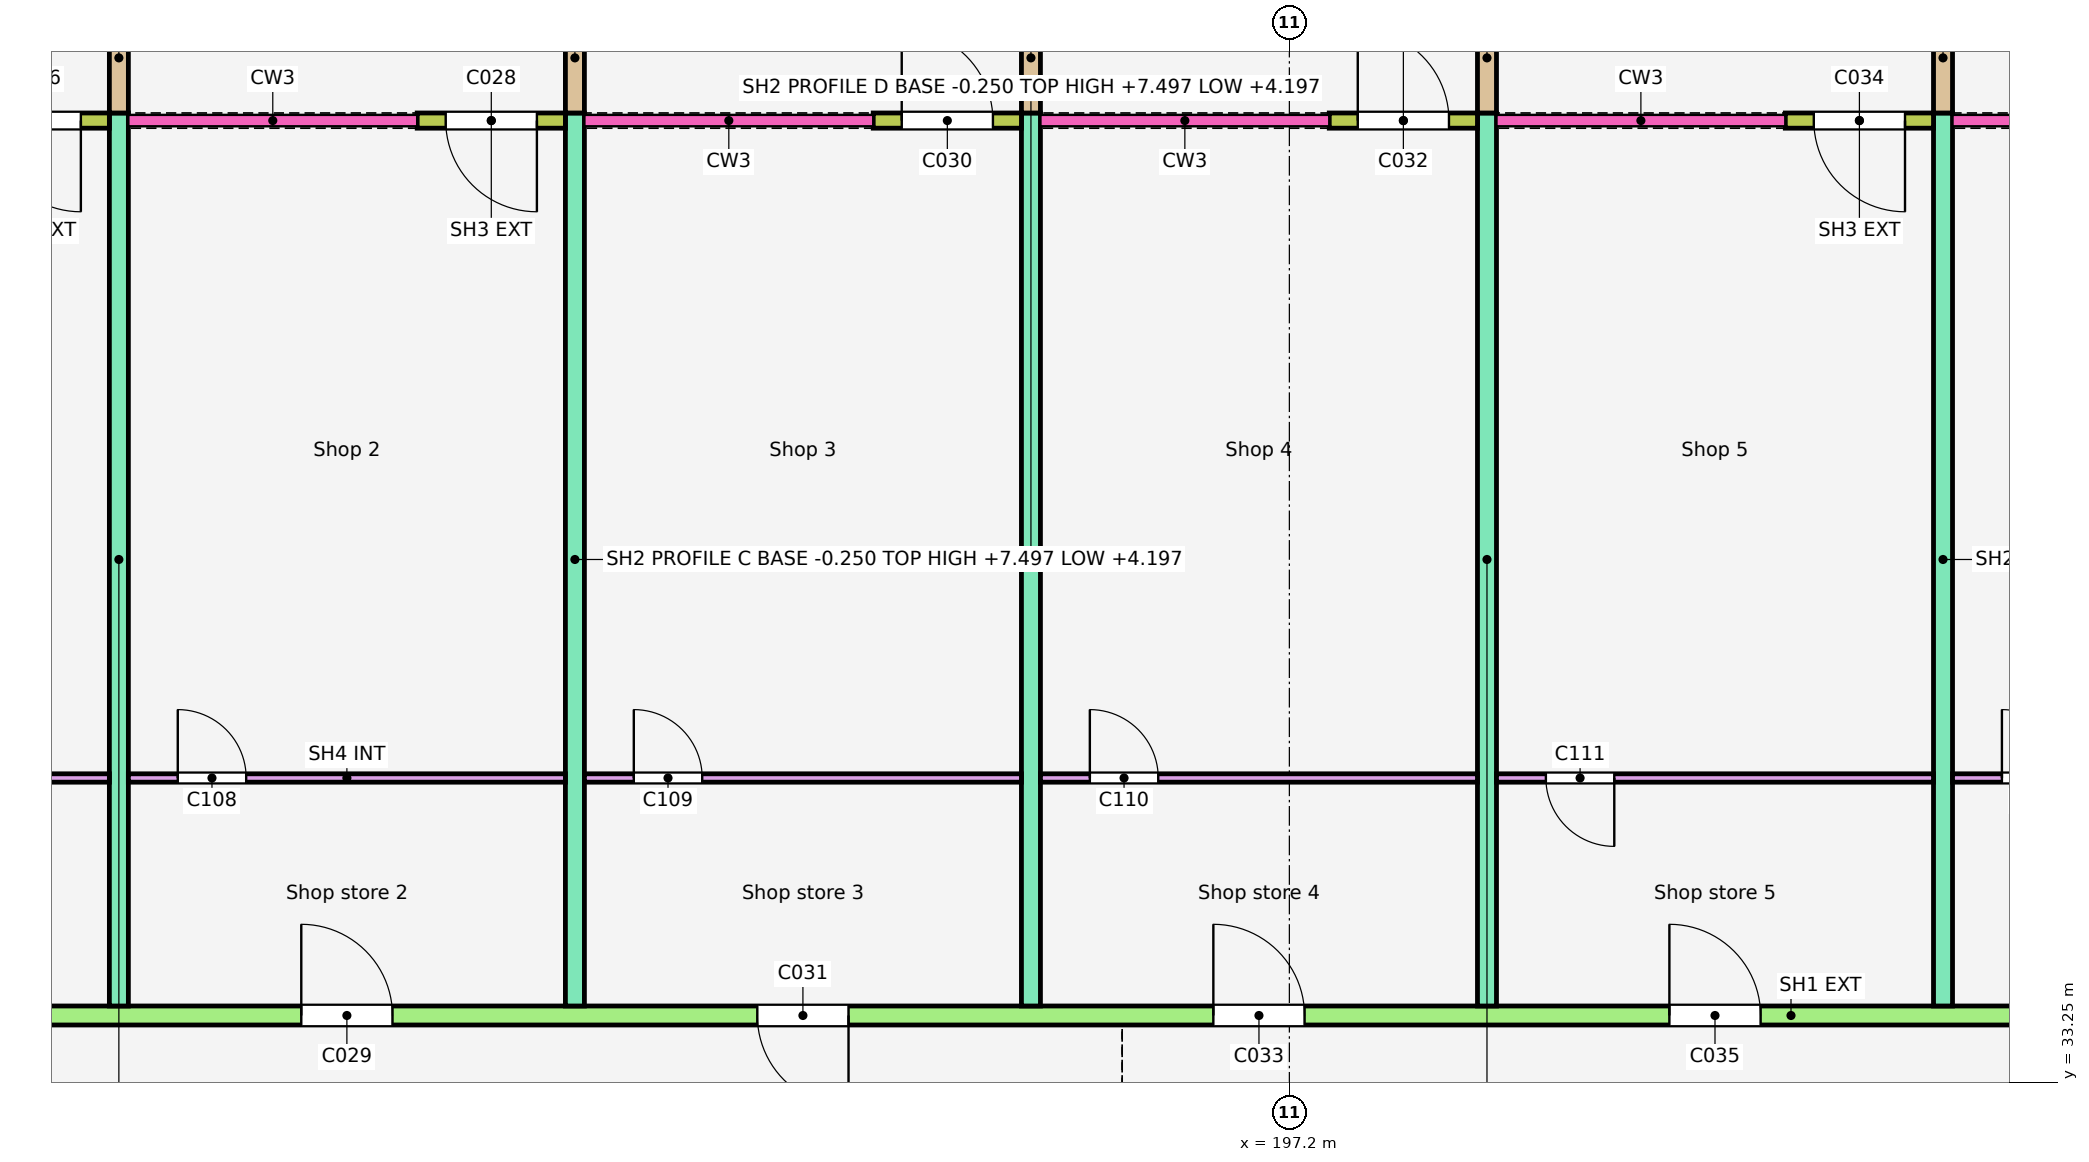
"""IFC4 building model, lengths in metres.
Left out: names, types, materials, properties, quantities, classifications, styles, units other than length and angle.
Written with IfcOpenShell. Run it as: python <this file> out.ifc"""

import sys

from ifc_helpers import new_model, si_unit, direction, frame, frame_2d, origin, place, context, subcontext, project, spatial, polyline, rectangle, outline, extrude, element, fill, save


model = new_model("IFC4")
c1 = context("Model", 3, precision=1e-05, world=origin(), true_north=direction((0.0, 1.0)))
c2 = subcontext(c1, "Body", "Model", "MODEL_VIEW")
j1 = project(units=[si_unit("LENGTHUNIT", "METRE"), si_unit("PLANEANGLEUNIT", "RADIAN")], contexts=[c1])
p1 = place(None, origin())
s1 = spatial("IfcSite", under=j1, at=p1, CompositionType="ELEMENT")
p2 = place(p1, origin())
s2 = spatial("IfcBuilding", under=s1, at=p2, CompositionType="ELEMENT")
p3 = place(p2, origin())
s3 = spatial("IfcBuildingStorey", under=s2, at=p3, CompositionType="ELEMENT", Elevation=0.0)
p4 = place(p3, frame((175.8, 34.125, -0.25), z_axis=(0.0, 0.0, 1.0), x_axis=(1.0, 0.0, 0.0)))
e1 = element("IfcWall", 1, at=p4, inside=s3, PredefinedType="SOLIDWALL", context=c2, shape_type="SweptSolid", body=[
    extrude(rectangle(XDim=56.0, YDim=0.25, at=frame_2d((28.0, 0.0))), origin(), (0.0, 0.0, 1.0), 4.445),
])
p5 = place(p4, frame((2.462, 0.0, 0.25)))
e2 = element("IfcOpeningElement", 2, at=p5, cuts=e1, PredefinedType="OPENING", context=c2, shape_type="SweptSolid", body=[
    extrude(rectangle(XDim=1.2, YDim=2.1, at=frame_2d((0.6, 1.05))), frame((0.0, 0.135, 0.0), z_axis=(0.0, -1.0, 0.0), x_axis=(1.0, 0.0, 0.0)), (0.0, 0.0, 1.0), 0.27),
])
p6 = place(p4, frame((8.4, 0.0, 0.25)))
e3 = element("IfcOpeningElement", 3, at=p6, cuts=e1, PredefinedType="OPENING", context=c2, shape_type="SweptSolid", body=[
    extrude(rectangle(XDim=1.2, YDim=2.1, at=frame_2d((0.6, 1.05))), frame((0.0, 0.135, 0.0), z_axis=(0.0, -1.0, 0.0), x_axis=(1.0, 0.0, 0.0)), (0.0, 0.0, 1.0), 0.27),
])
p7 = place(p4, frame((14.4, 0.0, 0.25)))
e4 = element("IfcOpeningElement", 4, at=p7, cuts=e1, PredefinedType="OPENING", context=c2, shape_type="SweptSolid", body=[
    extrude(rectangle(XDim=1.2, YDim=2.1, at=frame_2d((0.6, 1.05))), frame((0.0, 0.135, 0.0), z_axis=(0.0, -1.0, 0.0), x_axis=(1.0, 0.0, 0.0)), (0.0, 0.0, 1.0), 0.27),
])
p8 = place(p4, frame((20.4, 0.0, 0.25)))
e5 = element("IfcOpeningElement", 5, at=p8, cuts=e1, PredefinedType="OPENING", context=c2, shape_type="SweptSolid", body=[
    extrude(rectangle(XDim=1.2, YDim=2.1, at=frame_2d((0.6, 1.05))), frame((0.0, 0.135, 0.0), z_axis=(0.0, -1.0, 0.0), x_axis=(1.0, 0.0, 0.0)), (0.0, 0.0, 1.0), 0.27),
])
p9 = place(p4, frame((26.4, 0.0, 0.25)))
e6 = element("IfcOpeningElement", 6, at=p9, cuts=e1, PredefinedType="OPENING", context=c2, shape_type="SweptSolid", body=[
    extrude(rectangle(XDim=1.2, YDim=2.1, at=frame_2d((0.6, 1.05))), frame((0.0, 0.135, 0.0), z_axis=(0.0, -1.0, 0.0), x_axis=(1.0, 0.0, 0.0)), (0.0, 0.0, 1.0), 0.27),
])
p10 = place(p4, frame((32.4, 0.0, 0.25)))
e7 = element("IfcOpeningElement", 7, at=p10, cuts=e1, PredefinedType="OPENING", context=c2, shape_type="SweptSolid", body=[
    extrude(rectangle(XDim=1.2, YDim=2.1, at=frame_2d((0.6, 1.05))), frame((0.0, 0.135, 0.0), z_axis=(0.0, -1.0, 0.0), x_axis=(1.0, 0.0, 0.0)), (0.0, 0.0, 1.0), 0.27),
])
p11 = place(p4, frame((38.4, 0.0, 0.25)))
e8 = element("IfcOpeningElement", 8, at=p11, cuts=e1, PredefinedType="OPENING", context=c2, shape_type="SweptSolid", body=[
    extrude(rectangle(XDim=1.2, YDim=2.1, at=frame_2d((0.6, 1.05))), frame((0.0, 0.135, 0.0), z_axis=(0.0, -1.0, 0.0), x_axis=(1.0, 0.0, 0.0)), (0.0, 0.0, 1.0), 0.27),
])
p12 = place(p4, frame((44.4, 0.0, 0.25)))
e9 = element("IfcOpeningElement", 9, at=p12, cuts=e1, PredefinedType="OPENING", context=c2, shape_type="SweptSolid", body=[
    extrude(rectangle(XDim=1.2, YDim=2.1, at=frame_2d((0.6, 1.05))), frame((0.0, 0.135, 0.0), z_axis=(0.0, -1.0, 0.0), x_axis=(1.0, 0.0, 0.0)), (0.0, 0.0, 1.0), 0.27),
])
p13 = place(p4, frame((49.5, 0.0, 0.25)))
e10 = element("IfcOpeningElement", 10, at=p13, cuts=e1, PredefinedType="OPENING", context=c2, shape_type="SweptSolid", body=[
    extrude(rectangle(XDim=1.2, YDim=2.1, at=frame_2d((0.6, 1.05))), frame((0.0, 0.135, 0.0), z_axis=(0.0, -1.0, 0.0), x_axis=(1.0, 0.0, 0.0)), (0.0, 0.0, 1.0), 0.27),
])
p14 = place(p4, frame((53.3, 0.0, 0.25)))
e11 = element("IfcOpeningElement", 11, at=p14, cuts=e1, PredefinedType="OPENING", context=c2, shape_type="SweptSolid", body=[
    extrude(rectangle(XDim=1.0, YDim=2.1, at=frame_2d((0.5, 1.05))), frame((0.0, 0.135, 0.0), z_axis=(0.0, -1.0, 0.0), x_axis=(1.0, 0.0, 0.0)), (0.0, 0.0, 1.0), 0.27),
])
for number, where, z_axis, x_axis in (
    (12, (181.8, 34.25, -0.25), (0.0, 0.0, 1.0), (0.0, 1.0, 0.0)),
    (13, (187.8, 34.25, -0.25), (0.0, 0.0, 1.0), (0.0, 1.0, 0.0)),
    (14, (193.8, 34.25, -0.25), (0.0, 0.0, 1.0), (0.0, 1.0, 0.0)),
    (15, (199.8, 34.25, -0.25), (0.0, 0.0, 1.0), (0.0, 1.0, 0.0)),
    (16, (205.8, 34.25, -0.25), (0.0, 0.0, 1.0), (0.0, 1.0, 0.0)),
):
    element("IfcWall", number, at=place(p3, frame(where, z_axis=z_axis, x_axis=x_axis)), inside=s3, PredefinedType="SOLIDWALL", context=c2, shape_type="SweptSolid", body=[
        extrude(outline(polyline([(0.0, 0.0), (11.75, 0.0), (11.55, 7.663), (7.726, 4.447), (7.725, 7.747), (3.801, 4.447), (3.8, 7.747), (0.0, 4.552), (0.0, 0.0)])), frame((0.0, 0.125, 0.0), z_axis=(0.0, -1.0, 0.0), x_axis=(1.0, 0.0, 0.0)), (0.0, 0.0, 1.0), 0.25),
    ])
p15 = place(p3, frame((179.725, 45.9, -0.25), z_axis=(0.0, 0.0, 1.0), x_axis=(1.0, 0.0, 0.0)))
e17 = element("IfcWall", 17, at=p15, inside=s3, PredefinedType="SOLIDWALL", context=c2, shape_type="SweptSolid", body=[
    extrude(rectangle(XDim=1.95, YDim=0.2, at=frame_2d((0.975, 0.0))), origin(), (0.0, 0.0, 1.0), 4.45),
])
p16 = place(p15, frame((0.375, 0.0, 0.25)))
e18 = element("IfcOpeningElement", 18, at=p16, cuts=e17, PredefinedType="OPENING", context=c2, shape_type="SweptSolid", body=[
    extrude(rectangle(XDim=1.2, YDim=2.1, at=frame_2d((0.6, 1.05))), frame((0.0, 0.11, 0.0), z_axis=(0.0, -1.0, 0.0), x_axis=(1.0, 0.0, 0.0)), (0.0, 0.0, 1.0), 0.22),
])
p17 = place(p3, frame((185.725, 45.9, -0.25), z_axis=(0.0, 0.0, 1.0), x_axis=(1.0, 0.0, 0.0)))
e19 = element("IfcWall", 19, at=p17, inside=s3, PredefinedType="SOLIDWALL", context=c2, shape_type="SweptSolid", body=[
    extrude(rectangle(XDim=1.95, YDim=0.2, at=frame_2d((0.975, 0.0))), origin(), (0.0, 0.0, 1.0), 4.45),
])
p18 = place(p17, frame((0.375, 0.0, 0.25)))
e20 = element("IfcOpeningElement", 20, at=p18, cuts=e19, PredefinedType="OPENING", context=c2, shape_type="SweptSolid", body=[
    extrude(rectangle(XDim=1.2, YDim=2.1, at=frame_2d((0.6, 1.05))), frame((0.0, 0.11, 0.0), z_axis=(0.0, -1.0, 0.0), x_axis=(1.0, 0.0, 0.0)), (0.0, 0.0, 1.0), 0.22),
])
p19 = place(p3, frame((191.725, 45.9, -0.25), z_axis=(0.0, 0.0, 1.0), x_axis=(1.0, 0.0, 0.0)))
e21 = element("IfcWall", 21, at=p19, inside=s3, PredefinedType="SOLIDWALL", context=c2, shape_type="SweptSolid", body=[
    extrude(rectangle(XDim=1.95, YDim=0.2, at=frame_2d((0.975, 0.0))), origin(), (0.0, 0.0, 1.0), 4.45),
])
p20 = place(p19, frame((0.375, 0.0, 0.25)))
e22 = element("IfcOpeningElement", 22, at=p20, cuts=e21, PredefinedType="OPENING", context=c2, shape_type="SweptSolid", body=[
    extrude(rectangle(XDim=1.2, YDim=2.1, at=frame_2d((0.6, 1.05))), frame((0.0, 0.11, 0.0), z_axis=(0.0, -1.0, 0.0), x_axis=(1.0, 0.0, 0.0)), (0.0, 0.0, 1.0), 0.22),
])
p21 = place(p3, frame((197.725, 45.9, -0.25), z_axis=(0.0, 0.0, 1.0), x_axis=(1.0, 0.0, 0.0)))
e23 = element("IfcWall", 23, at=p21, inside=s3, PredefinedType="SOLIDWALL", context=c2, shape_type="SweptSolid", body=[
    extrude(rectangle(XDim=1.95, YDim=0.2, at=frame_2d((0.975, 0.0))), origin(), (0.0, 0.0, 1.0), 4.45),
])
p22 = place(p21, frame((0.375, 0.0, 0.25)))
e24 = element("IfcOpeningElement", 24, at=p22, cuts=e23, PredefinedType="OPENING", context=c2, shape_type="SweptSolid", body=[
    extrude(rectangle(XDim=1.2, YDim=2.1, at=frame_2d((0.6, 1.05))), frame((0.0, 0.11, 0.0), z_axis=(0.0, -1.0, 0.0), x_axis=(1.0, 0.0, 0.0)), (0.0, 0.0, 1.0), 0.22),
])
p23 = place(p3, frame((203.725, 45.9, -0.25), z_axis=(0.0, 0.0, 1.0), x_axis=(1.0, 0.0, 0.0)))
e25 = element("IfcWall", 25, at=p23, inside=s3, PredefinedType="SOLIDWALL", context=c2, shape_type="SweptSolid", body=[
    extrude(rectangle(XDim=1.95, YDim=0.2, at=frame_2d((0.975, 0.0))), origin(), (0.0, 0.0, 1.0), 4.45),
])
p24 = place(p23, frame((0.375, 0.0, 0.25)))
e26 = element("IfcOpeningElement", 26, at=p24, cuts=e25, PredefinedType="OPENING", context=c2, shape_type="SweptSolid", body=[
    extrude(rectangle(XDim=1.2, YDim=2.1, at=frame_2d((0.6, 1.05))), frame((0.0, 0.11, 0.0), z_axis=(0.0, -1.0, 0.0), x_axis=(1.0, 0.0, 0.0)), (0.0, 0.0, 1.0), 0.22),
])
for number, where, z_axis, x_axis in (
    (27, (181.8, 46.0, -0.25), (0.0, 0.0, 1.0), (0.0, 1.0, 0.0)),
    (28, (187.8, 46.0, -0.25), (0.0, 0.0, 1.0), (0.0, 1.0, 0.0)),
    (29, (193.8, 46.0, -0.25), (0.0, 0.0, 1.0), (0.0, 1.0, 0.0)),
    (30, (199.8, 46.0, -0.25), (0.0, 0.0, 1.0), (0.0, 1.0, 0.0)),
    (31, (205.8, 46.0, -0.25), (0.0, 0.0, 1.0), (0.0, 1.0, 0.0)),
):
    element("IfcWall", number, at=place(p3, frame(where, z_axis=z_axis, x_axis=x_axis)), inside=s3, PredefinedType="SOLIDWALL", context=c2, shape_type="SweptSolid", body=[
        extrude(outline(polyline([(0.0, 0.0), (1.45, 0.0), (1.45, 4.36), (0.0, 4.447), (0.0, 0.0)])), frame((0.0, 0.125, 0.0), z_axis=(0.0, -1.0, 0.0), x_axis=(1.0, 0.0, 0.0)), (0.0, 0.0, 1.0), 0.25),
    ])
p25 = place(p3, frame((176.05, 37.25, 0.0), z_axis=(0.0, 0.0, 1.0), x_axis=(1.0, 0.0, 0.0)))
e32 = element("IfcWall", 32, at=p25, inside=s3, PredefinedType="PARTITIONING", context=c2, shape_type="SweptSolid", body=[
    extrude(rectangle(XDim=5.625, YDim=0.11, at=frame_2d((2.812, 0.0))), origin(), (0.0, 0.0, 1.0), 3.0),
])
p26 = place(p25, frame((0.65, 0.0, 0.0)))
e33 = element("IfcOpeningElement", 33, at=p26, cuts=e32, PredefinedType="OPENING", context=c2, shape_type="SweptSolid", body=[
    extrude(rectangle(XDim=0.9, YDim=2.1, at=frame_2d((0.45, 1.05))), frame((0.0, 0.065, 0.0), z_axis=(0.0, -1.0, 0.0), x_axis=(1.0, 0.0, 0.0)), (0.0, 0.0, 1.0), 0.13),
])
p27 = place(p3, frame((181.925, 37.25, 0.0), z_axis=(0.0, 0.0, 1.0), x_axis=(1.0, 0.0, 0.0)))
e34 = element("IfcWall", 34, at=p27, inside=s3, PredefinedType="PARTITIONING", context=c2, shape_type="SweptSolid", body=[
    extrude(rectangle(XDim=5.75, YDim=0.11, at=frame_2d((2.875, 0.0))), origin(), (0.0, 0.0, 1.0), 3.0),
])
p28 = place(p27, frame((0.65, 0.0, 0.0)))
e35 = element("IfcOpeningElement", 35, at=p28, cuts=e34, PredefinedType="OPENING", context=c2, shape_type="SweptSolid", body=[
    extrude(rectangle(XDim=0.9, YDim=2.1, at=frame_2d((0.45, 1.05))), frame((0.0, 0.065, 0.0), z_axis=(0.0, -1.0, 0.0), x_axis=(1.0, 0.0, 0.0)), (0.0, 0.0, 1.0), 0.13),
])
p29 = place(p3, frame((187.925, 37.25, 0.0), z_axis=(0.0, 0.0, 1.0), x_axis=(1.0, 0.0, 0.0)))
e36 = element("IfcWall", 36, at=p29, inside=s3, PredefinedType="PARTITIONING", context=c2, shape_type="SweptSolid", body=[
    extrude(rectangle(XDim=5.75, YDim=0.11, at=frame_2d((2.875, 0.0))), origin(), (0.0, 0.0, 1.0), 3.0),
])
p30 = place(p29, frame((0.65, 0.0, 0.0)))
e37 = element("IfcOpeningElement", 37, at=p30, cuts=e36, PredefinedType="OPENING", context=c2, shape_type="SweptSolid", body=[
    extrude(rectangle(XDim=0.9, YDim=2.1, at=frame_2d((0.45, 1.05))), frame((0.0, 0.065, 0.0), z_axis=(0.0, -1.0, 0.0), x_axis=(1.0, 0.0, 0.0)), (0.0, 0.0, 1.0), 0.13),
])
p31 = place(p3, frame((193.925, 37.25, 0.0), z_axis=(0.0, 0.0, 1.0), x_axis=(1.0, 0.0, 0.0)))
e38 = element("IfcWall", 38, at=p31, inside=s3, PredefinedType="PARTITIONING", context=c2, shape_type="SweptSolid", body=[
    extrude(rectangle(XDim=5.75, YDim=0.11, at=frame_2d((2.875, 0.0))), origin(), (0.0, 0.0, 1.0), 3.0),
])
p32 = place(p31, frame((0.65, 0.0, 0.0)))
e39 = element("IfcOpeningElement", 39, at=p32, cuts=e38, PredefinedType="OPENING", context=c2, shape_type="SweptSolid", body=[
    extrude(rectangle(XDim=0.9, YDim=2.1, at=frame_2d((0.45, 1.05))), frame((0.0, 0.065, 0.0), z_axis=(0.0, -1.0, 0.0), x_axis=(1.0, 0.0, 0.0)), (0.0, 0.0, 1.0), 0.13),
])
p33 = place(p3, frame((199.925, 37.25, 0.0), z_axis=(0.0, 0.0, 1.0), x_axis=(1.0, 0.0, 0.0)))
e40 = element("IfcWall", 40, at=p33, inside=s3, PredefinedType="PARTITIONING", context=c2, shape_type="SweptSolid", body=[
    extrude(rectangle(XDim=5.75, YDim=0.11, at=frame_2d((2.875, 0.0))), origin(), (0.0, 0.0, 1.0), 3.0),
])
p34 = place(p33, frame((0.65, 0.0, 0.0)))
e41 = element("IfcOpeningElement", 41, at=p34, cuts=e40, PredefinedType="OPENING", context=c2, shape_type="SweptSolid", body=[
    extrude(rectangle(XDim=0.9, YDim=2.1, at=frame_2d((0.45, 1.05))), frame((0.0, 0.065, 0.0), z_axis=(0.0, -1.0, 0.0), x_axis=(1.0, 0.0, 0.0)), (0.0, 0.0, 1.0), 0.13),
])
p35 = place(p3, frame((205.925, 37.25, 0.0), z_axis=(0.0, 0.0, 1.0), x_axis=(1.0, 0.0, 0.0)))
e42 = element("IfcWall", 42, at=p35, inside=s3, PredefinedType="PARTITIONING", context=c2, shape_type="SweptSolid", body=[
    extrude(rectangle(XDim=5.75, YDim=0.11, at=frame_2d((2.875, 0.0))), origin(), (0.0, 0.0, 1.0), 3.0),
])
p36 = place(p35, frame((0.65, 0.0, 0.0)))
e43 = element("IfcOpeningElement", 43, at=p36, cuts=e42, PredefinedType="OPENING", context=c2, shape_type="SweptSolid", body=[
    extrude(rectangle(XDim=0.9, YDim=2.1, at=frame_2d((0.45, 1.05))), frame((0.0, 0.065, 0.0), z_axis=(0.0, -1.0, 0.0), x_axis=(1.0, 0.0, 0.0)), (0.0, 0.0, 1.0), 0.13),
])
p37 = place(p16, origin())
e44 = element("IfcDoor", 44, at=p37, inside=s3, OperationType="SINGLE_SWING_RIGHT", PredefinedType="DOOR", context=c2, shape_type="SweptSolid", body=[
    extrude(rectangle(XDim=1.2, YDim=2.1, at=frame_2d((0.6, 1.05))), frame((0.0, 0.025, 0.0), z_axis=(0.0, -1.0, 0.0), x_axis=(1.0, 0.0, 0.0)), (0.0, 0.0, 1.0), 0.05),
])
fill(e18, e44)
p38 = place(p18, origin())
e45 = element("IfcDoor", 45, at=p38, inside=s3, OperationType="SINGLE_SWING_RIGHT", PredefinedType="DOOR", context=c2, shape_type="SweptSolid", body=[
    extrude(rectangle(XDim=1.2, YDim=2.1, at=frame_2d((0.6, 1.05))), frame((0.0, 0.025, 0.0), z_axis=(0.0, -1.0, 0.0), x_axis=(1.0, 0.0, 0.0)), (0.0, 0.0, 1.0), 0.05),
])
fill(e20, e45)
p39 = place(p6, origin())
e46 = element("IfcDoor", 46, at=p39, inside=s3, OperationType="SINGLE_SWING_LEFT", PredefinedType="DOOR", context=c2, shape_type="SweptSolid", body=[
    extrude(rectangle(XDim=1.2, YDim=2.1, at=frame_2d((0.6, 1.05))), frame((0.0, 0.025, 0.0), z_axis=(0.0, -1.0, 0.0), x_axis=(1.0, 0.0, 0.0)), (0.0, 0.0, 1.0), 0.05),
])
fill(e3, e46)
p40 = place(p20, origin())
e47 = element("IfcDoor", 47, at=p40, inside=s3, OperationType="SINGLE_SWING_LEFT", PredefinedType="DOOR", context=c2, shape_type="SweptSolid", body=[
    extrude(rectangle(XDim=1.2, YDim=2.1, at=frame_2d((0.6, 1.05))), frame((0.0, 0.025, 0.0), z_axis=(0.0, -1.0, 0.0), x_axis=(1.0, 0.0, 0.0)), (0.0, 0.0, 1.0), 0.05),
])
fill(e22, e47)
p41 = place(p7, origin())
e48 = element("IfcDoor", 48, at=p41, inside=s3, OperationType="SINGLE_SWING_RIGHT", PredefinedType="DOOR", context=c2, shape_type="SweptSolid", body=[
    extrude(rectangle(XDim=1.2, YDim=2.1, at=frame_2d((0.6, 1.05))), frame((0.0, 0.025, 0.0), z_axis=(0.0, -1.0, 0.0), x_axis=(1.0, 0.0, 0.0)), (0.0, 0.0, 1.0), 0.05),
])
fill(e4, e48)
p42 = place(p22, origin())
e49 = element("IfcDoor", 49, at=p42, inside=s3, OperationType="SINGLE_SWING_LEFT", PredefinedType="DOOR", context=c2, shape_type="SweptSolid", body=[
    extrude(rectangle(XDim=1.2, YDim=2.1, at=frame_2d((0.6, 1.05))), frame((0.0, 0.025, 0.0), z_axis=(0.0, -1.0, 0.0), x_axis=(1.0, 0.0, 0.0)), (0.0, 0.0, 1.0), 0.05),
])
fill(e24, e49)
p43 = place(p8, origin())
e50 = element("IfcDoor", 50, at=p43, inside=s3, OperationType="SINGLE_SWING_LEFT", PredefinedType="DOOR", context=c2, shape_type="SweptSolid", body=[
    extrude(rectangle(XDim=1.2, YDim=2.1, at=frame_2d((0.6, 1.05))), frame((0.0, 0.025, 0.0), z_axis=(0.0, -1.0, 0.0), x_axis=(1.0, 0.0, 0.0)), (0.0, 0.0, 1.0), 0.05),
])
fill(e5, e50)
p44 = place(p24, origin())
e51 = element("IfcDoor", 51, at=p44, inside=s3, OperationType="SINGLE_SWING_RIGHT", PredefinedType="DOOR", context=c2, shape_type="SweptSolid", body=[
    extrude(rectangle(XDim=1.2, YDim=2.1, at=frame_2d((0.6, 1.05))), frame((0.0, 0.025, 0.0), z_axis=(0.0, -1.0, 0.0), x_axis=(1.0, 0.0, 0.0)), (0.0, 0.0, 1.0), 0.05),
])
fill(e26, e51)
p45 = place(p9, origin())
e52 = element("IfcDoor", 52, at=p45, inside=s3, OperationType="SINGLE_SWING_LEFT", PredefinedType="DOOR", context=c2, shape_type="SweptSolid", body=[
    extrude(rectangle(XDim=1.2, YDim=2.1, at=frame_2d((0.6, 1.05))), frame((0.0, 0.025, 0.0), z_axis=(0.0, -1.0, 0.0), x_axis=(1.0, 0.0, 0.0)), (0.0, 0.0, 1.0), 0.05),
])
fill(e6, e52)
p46 = place(p28, origin())
e53 = element("IfcDoor", 53, at=p46, inside=s3, OperationType="SINGLE_SWING_LEFT", PredefinedType="DOOR", context=c2, shape_type="SweptSolid", body=[
    extrude(rectangle(XDim=0.9, YDim=2.1, at=frame_2d((0.45, 1.05))), frame((0.0, 0.025, 0.0), z_axis=(0.0, -1.0, 0.0), x_axis=(1.0, 0.0, 0.0)), (0.0, 0.0, 1.0), 0.05),
])
fill(e35, e53)
p47 = place(p30, origin())
e54 = element("IfcDoor", 54, at=p47, inside=s3, OperationType="SINGLE_SWING_LEFT", PredefinedType="DOOR", context=c2, shape_type="SweptSolid", body=[
    extrude(rectangle(XDim=0.9, YDim=2.1, at=frame_2d((0.45, 1.05))), frame((0.0, 0.025, 0.0), z_axis=(0.0, -1.0, 0.0), x_axis=(1.0, 0.0, 0.0)), (0.0, 0.0, 1.0), 0.05),
])
fill(e37, e54)
p48 = place(p32, origin())
e55 = element("IfcDoor", 55, at=p48, inside=s3, OperationType="SINGLE_SWING_LEFT", PredefinedType="DOOR", context=c2, shape_type="SweptSolid", body=[
    extrude(rectangle(XDim=0.9, YDim=2.1, at=frame_2d((0.45, 1.05))), frame((0.0, 0.025, 0.0), z_axis=(0.0, -1.0, 0.0), x_axis=(1.0, 0.0, 0.0)), (0.0, 0.0, 1.0), 0.05),
])
fill(e39, e55)
p49 = place(p34, origin())
e56 = element("IfcDoor", 56, at=p49, inside=s3, OperationType="SINGLE_SWING_RIGHT", PredefinedType="DOOR", context=c2, shape_type="SweptSolid", body=[
    extrude(rectangle(XDim=0.9, YDim=2.1, at=frame_2d((0.45, 1.05))), frame((0.0, 0.025, 0.0), z_axis=(0.0, -1.0, 0.0), x_axis=(1.0, 0.0, 0.0)), (0.0, 0.0, 1.0), 0.05),
])
fill(e41, e56)
p50 = place(p36, origin())
e57 = element("IfcDoor", 57, at=p50, inside=s3, OperationType="SINGLE_SWING_LEFT", PredefinedType="DOOR", context=c2, shape_type="SweptSolid", body=[
    extrude(rectangle(XDim=0.9, YDim=2.1, at=frame_2d((0.45, 1.05))), frame((0.0, 0.025, 0.0), z_axis=(0.0, -1.0, 0.0), x_axis=(1.0, 0.0, 0.0)), (0.0, 0.0, 1.0), 0.05),
])
fill(e43, e57)
save(model, sys.argv[1])
